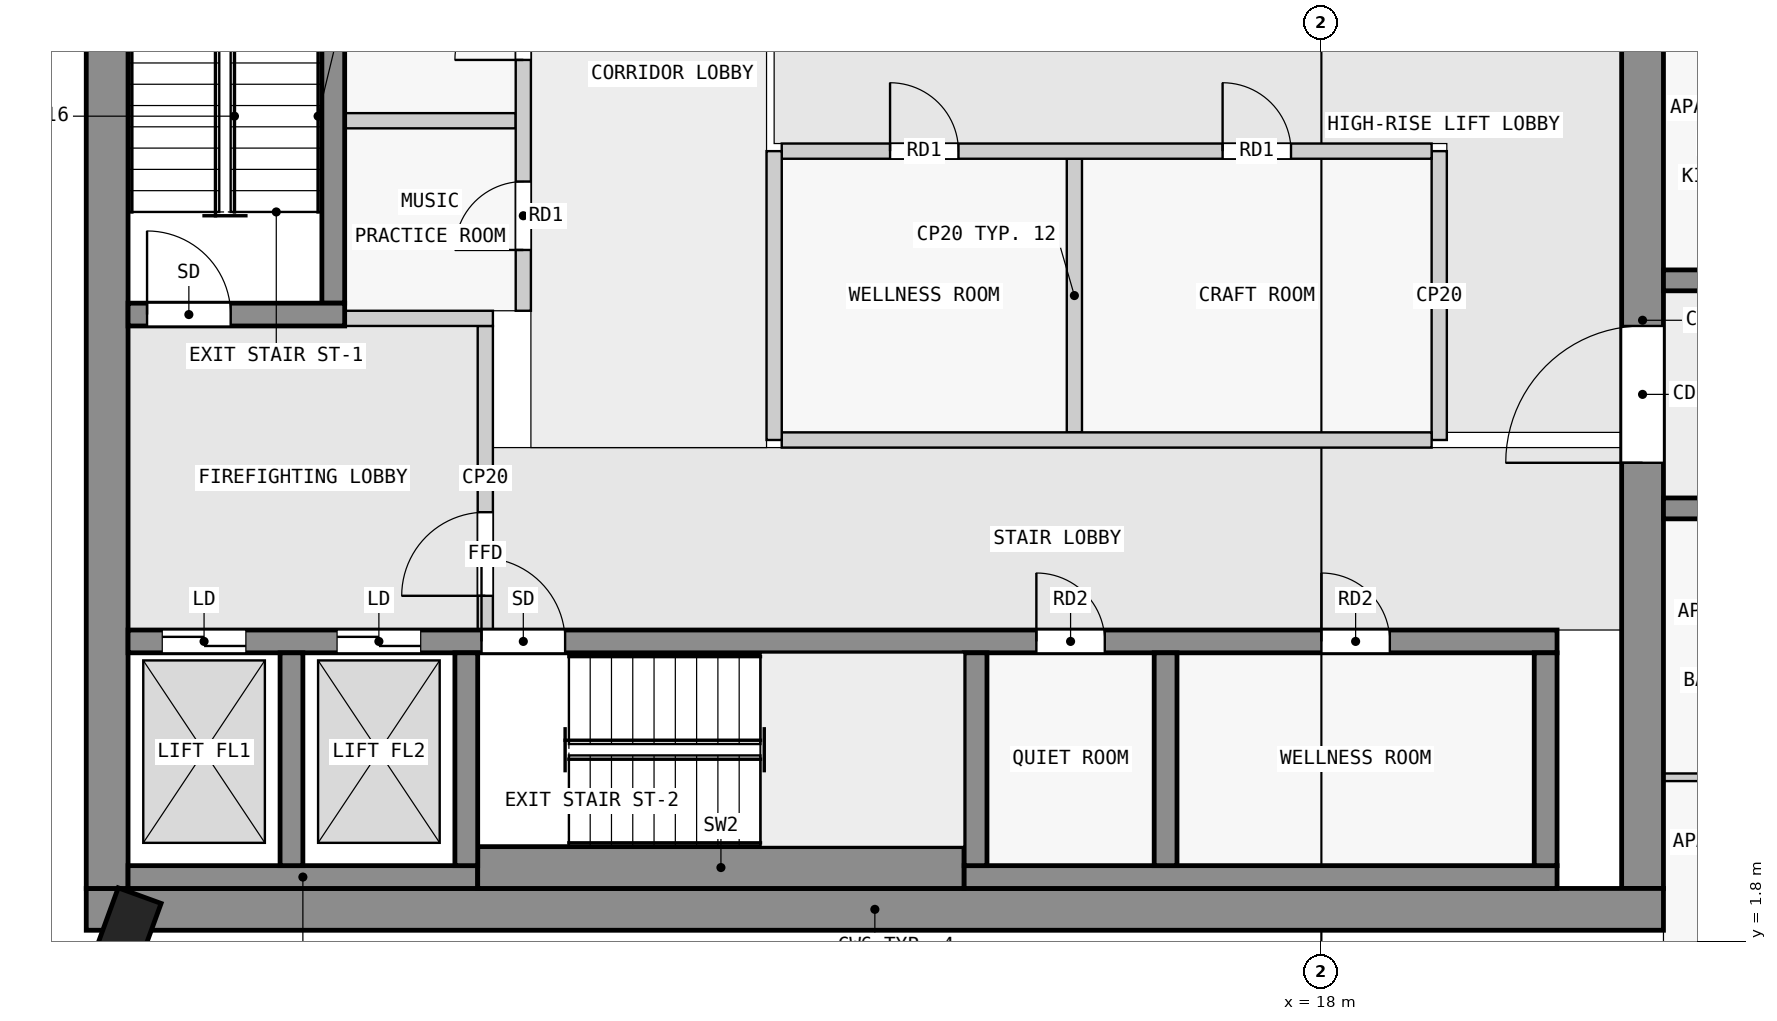
"""IFC4 building model, lengths in metres.
Left out: names, types, materials, properties, quantities, classifications, styles, units other than length and angle.
Written with IfcOpenShell. Run it as: python <this file> out.ifc"""

import sys

from ifc_helpers import new_model, si_unit, direction, frame, frame_2d, origin, origin_2d, place, context, subcontext, project, spatial, rectangle, extrude, element, fill, save


model = new_model("IFC4")
c1 = context("Model", 3, precision=1e-05, world=origin(), true_north=direction((0.0, 1.0)))
c2 = subcontext(c1, "Body", "Model", "MODEL_VIEW")
j1 = project(units=[si_unit("LENGTHUNIT", "METRE"), si_unit("PLANEANGLEUNIT", "RADIAN")], contexts=[c1])
p1 = place(None, origin())
s1 = spatial("IfcSite", under=j1, at=p1, CompositionType="ELEMENT")
p2 = place(p1, origin())
s2 = spatial("IfcBuilding", under=s1, at=p2, CompositionType="ELEMENT")
p3 = place(p2, frame((0.0, 0.0, 201.4)))
s3 = spatial("IfcBuildingStorey", under=s2, at=p3, CompositionType="ELEMENT", Elevation=201.4)
p4 = place(p3, frame((2.213, 1.748, 0.0), z_axis=(0.0, 0.0, 1.0), x_axis=(-0.939664280925, 0.342097996418, 0.0)))
e1 = element("IfcColumn", 1, at=p4, inside=s3, PredefinedType="COLUMN", context=c2, shape_type="SweptSolid", body=[
    extrude(rectangle(XDim=0.6, YDim=1.4, at=origin_2d()), origin(), (0.0, 0.0, 1.0), 3.5),
])
p5 = place(p3, frame((1.75, 2.225, 0.0), z_axis=(0.0, 0.0, 1.0), x_axis=(1.0, 0.0, 0.0)))
e2 = element("IfcWall", 2, at=p5, inside=s3, PredefinedType="SHEAR", context=c2, shape_type="SweptSolid", body=[
    extrude(rectangle(XDim=20.75, YDim=0.55, at=frame_2d((10.375, 0.0))), origin(), (0.0, 0.0, 1.0), 3.25),
])
p6 = place(p3, frame((2.025, 2.5, 0.0), z_axis=(0.0, 0.0, 1.0), x_axis=(0.0, 1.0, 0.0)))
e3 = element("IfcWall", 3, at=p6, inside=s3, PredefinedType="SHEAR", context=c2, shape_type="SweptSolid", body=[
    extrude(rectangle(XDim=14.95, YDim=0.55, at=frame_2d((7.475, 0.0))), origin(), (0.0, 0.0, 1.0), 3.25),
])
p7 = place(p3, frame((22.225, 2.5, 0.0), z_axis=(0.0, 0.0, 1.0), x_axis=(0.0, 1.0, 0.0)))
e4 = element("IfcWall", 4, at=p7, inside=s3, PredefinedType="SHEAR", context=c2, shape_type="SweptSolid", body=[
    extrude(rectangle(XDim=14.95, YDim=0.55, at=frame_2d((7.475, 0.0))), origin(), (0.0, 0.0, 1.0), 3.25),
])
p8 = place(p7, frame((5.6, 0.0, 0.0)))
e5 = element("IfcOpeningElement", 5, at=p8, cuts=e4, PredefinedType="OPENING", context=c2, shape_type="SweptSolid", body=[
    extrude(rectangle(XDim=1.8, YDim=2.1, at=frame_2d((0.9, 1.05))), frame((0.0, 0.285, 0.0), z_axis=(0.0, -1.0, 0.0), x_axis=(1.0, 0.0, 0.0)), (0.0, 0.0, 1.0), 0.57),
])
p9 = place(p3, frame((2.3, 2.65, 0.0), z_axis=(0.0, 0.0, 1.0), x_axis=(1.0, 0.0, 0.0)))
e6 = element("IfcWall", 6, at=p9, inside=s3, PredefinedType="SHEAR", context=c2, shape_type="SweptSolid", body=[
    extrude(rectangle(XDim=4.6, YDim=0.3, at=frame_2d((2.3, 0.0))), origin(), (0.0, 0.0, 1.0), 3.25),
])
p10 = place(p3, frame((6.9, 2.775, 0.0), z_axis=(0.0, 0.0, 1.0), x_axis=(1.0, 0.0, 0.0)))
e7 = element("IfcWall", 7, at=p10, inside=s3, PredefinedType="SHEAR", context=c2, shape_type="SweptSolid", body=[
    extrude(rectangle(XDim=6.4, YDim=0.55, at=frame_2d((3.2, 0.0))), origin(), (0.0, 0.0, 1.0), 3.25),
])
p11 = place(p3, frame((13.3, 2.65, 0.0), z_axis=(0.0, 0.0, 1.0), x_axis=(1.0, 0.0, 0.0)))
e8 = element("IfcWall", 8, at=p11, inside=s3, PredefinedType="SHEAR", context=c2, shape_type="SweptSolid", body=[
    extrude(rectangle(XDim=7.8, YDim=0.3, at=frame_2d((3.9, 0.0))), origin(), (0.0, 0.0, 1.0), 3.25),
])
for number, where, z_axis, x_axis in (
    (9, (4.45, 2.8, 0.0), (0.0, 0.0, 1.0), (0.0, 1.0, 0.0)),
    (10, (6.75, 2.8, 0.0), (0.0, 0.0, 1.0), (0.0, 1.0, 0.0)),
    (11, (13.45, 2.8, 0.0), (0.0, 0.0, 1.0), (0.0, 1.0, 0.0)),
    (12, (15.95, 2.8, 0.0), (0.0, 0.0, 1.0), (0.0, 1.0, 0.0)),
    (13, (20.95, 2.8, 0.0), (0.0, 0.0, 1.0), (0.0, 1.0, 0.0)),
):
    element("IfcWall", number, at=place(p3, frame(where, z_axis=z_axis, x_axis=x_axis)), inside=s3, PredefinedType="SHEAR", context=c2, shape_type="SweptSolid", body=[
        extrude(rectangle(XDim=2.8, YDim=0.3, at=frame_2d((1.4, 0.0))), origin(), (0.0, 0.0, 1.0), 3.25),
    ])
p12 = place(p3, frame((2.3, 5.75, 0.0), z_axis=(0.0, 0.0, 1.0), x_axis=(1.0, 0.0, 0.0)))
e14 = element("IfcWall", 14, at=p12, inside=s3, PredefinedType="SHEAR", context=c2, shape_type="SweptSolid", body=[
    extrude(rectangle(XDim=18.8, YDim=0.3, at=frame_2d((9.4, 0.0))), origin(), (0.0, 0.0, 1.0), 3.25),
])
p13 = place(p12, frame((4.65, 0.0, 0.0)))
e15 = element("IfcOpeningElement", 15, at=p13, cuts=e14, PredefinedType="OPENING", context=c2, shape_type="SweptSolid", body=[
    extrude(rectangle(XDim=1.1, YDim=2.1, at=frame_2d((0.55, 1.05))), frame((0.0, 0.16, 0.0), z_axis=(0.0, -1.0, 0.0), x_axis=(1.0, 0.0, 0.0)), (0.0, 0.0, 1.0), 0.32),
])
p14 = place(p12, frame((0.45, 0.0, 0.0)))
e16 = element("IfcOpeningElement", 16, at=p14, cuts=e14, PredefinedType="OPENING", context=c2, shape_type="SweptSolid", body=[
    extrude(rectangle(XDim=1.1, YDim=2.1, at=frame_2d((0.55, 1.05))), frame((0.0, 0.16, 0.0), z_axis=(0.0, -1.0, 0.0), x_axis=(1.0, 0.0, 0.0)), (0.0, 0.0, 1.0), 0.32),
])
p15 = place(p12, frame((2.75, 0.0, 0.0)))
e17 = element("IfcOpeningElement", 17, at=p15, cuts=e14, PredefinedType="OPENING", context=c2, shape_type="SweptSolid", body=[
    extrude(rectangle(XDim=1.1, YDim=2.1, at=frame_2d((0.55, 1.05))), frame((0.0, 0.16, 0.0), z_axis=(0.0, -1.0, 0.0), x_axis=(1.0, 0.0, 0.0)), (0.0, 0.0, 1.0), 0.32),
])
p16 = place(p12, frame((11.95, 0.0, 0.0)))
e18 = element("IfcOpeningElement", 18, at=p16, cuts=e14, PredefinedType="OPENING", context=c2, shape_type="SweptSolid", body=[
    extrude(rectangle(XDim=0.9, YDim=2.1, at=frame_2d((0.45, 1.05))), frame((0.0, 0.16, 0.0), z_axis=(0.0, -1.0, 0.0), x_axis=(1.0, 0.0, 0.0)), (0.0, 0.0, 1.0), 0.32),
])
p17 = place(p12, frame((15.7, 0.0, 0.0)))
e19 = element("IfcOpeningElement", 19, at=p17, cuts=e14, PredefinedType="OPENING", context=c2, shape_type="SweptSolid", body=[
    extrude(rectangle(XDim=0.9, YDim=2.1, at=frame_2d((0.45, 1.05))), frame((0.0, 0.16, 0.0), z_axis=(0.0, -1.0, 0.0), x_axis=(1.0, 0.0, 0.0)), (0.0, 0.0, 1.0), 0.32),
])
p18 = place(p3, frame((2.3, 10.05, 0.0), z_axis=(0.0, 0.0, 1.0), x_axis=(1.0, 0.0, 0.0)))
e20 = element("IfcWall", 20, at=p18, inside=s3, PredefinedType="SHEAR", context=c2, shape_type="SweptSolid", body=[
    extrude(rectangle(XDim=2.85, YDim=0.3, at=frame_2d((1.425, 0.0))), origin(), (0.0, 0.0, 1.0), 3.25),
])
p19 = place(p18, frame((0.25, 0.0, 0.0)))
e21 = element("IfcOpeningElement", 21, at=p19, cuts=e20, PredefinedType="OPENING", context=c2, shape_type="SweptSolid", body=[
    extrude(rectangle(XDim=1.1, YDim=2.1, at=frame_2d((0.55, 1.05))), frame((0.0, 0.16, 0.0), z_axis=(0.0, -1.0, 0.0), x_axis=(1.0, 0.0, 0.0)), (0.0, 0.0, 1.0), 0.32),
])
p20 = place(p3, frame((5.0, 10.2, 0.0), z_axis=(0.0, 0.0, 1.0), x_axis=(0.0, 1.0, 0.0)))
e22 = element("IfcWall", 22, at=p20, inside=s3, PredefinedType="SHEAR", context=c2, shape_type="SweptSolid", body=[
    extrude(rectangle(XDim=6.4, YDim=0.3, at=frame_2d((3.2, 0.0))), origin(), (0.0, 0.0, 1.0), 3.25),
])
p21 = place(p3, frame((22.5, 7.5, 0.0), z_axis=(0.0, 0.0, 1.0), x_axis=(1.0, 0.0, 0.0)))
e23 = element("IfcWall", 23, at=p21, inside=s3, PredefinedType="SHEAR", context=c2, shape_type="SweptSolid", body=[
    extrude(rectangle(XDim=22.5, YDim=0.275, at=frame_2d((11.25, 0.0))), origin(), (0.0, 0.0, 1.0), 3.25),
])
p22 = place(p21, frame((4.05, 0.0, 0.0)))
e24 = element("IfcOpeningElement", 24, at=p22, cuts=e23, PredefinedType="OPENING", context=c2, shape_type="SweptSolid", body=[
    extrude(rectangle(XDim=1.0, YDim=2.1, at=frame_2d((0.5, 1.05))), frame((0.0, 0.147, 0.0), z_axis=(0.0, -1.0, 0.0), x_axis=(1.0, 0.0, 0.0)), (0.0, 0.0, 1.0), 0.295),
])
p23 = place(p21, frame((10.35, 0.0, 0.0)))
e25 = element("IfcOpeningElement", 25, at=p23, cuts=e23, PredefinedType="OPENING", context=c2, shape_type="SweptSolid", body=[
    extrude(rectangle(XDim=1.8, YDim=2.1, at=frame_2d((0.9, 1.05))), frame((0.0, 0.147, 0.0), z_axis=(0.0, -1.0, 0.0), x_axis=(1.0, 0.0, 0.0)), (0.0, 0.0, 1.0), 0.295),
])
p24 = place(p21, frame((16.85, 0.0, 0.0)))
e26 = element("IfcOpeningElement", 26, at=p24, cuts=e23, PredefinedType="OPENING", context=c2, shape_type="SweptSolid", body=[
    extrude(rectangle(XDim=1.0, YDim=2.1, at=frame_2d((0.5, 1.05))), frame((0.0, 0.147, 0.0), z_axis=(0.0, -1.0, 0.0), x_axis=(1.0, 0.0, 0.0)), (0.0, 0.0, 1.0), 0.295),
])
p25 = place(p3, frame((22.5, 10.5, 0.0), z_axis=(0.0, 0.0, 1.0), x_axis=(1.0, 0.0, 0.0)))
e27 = element("IfcWall", 27, at=p25, inside=s3, PredefinedType="SHEAR", context=c2, shape_type="SweptSolid", body=[
    extrude(rectangle(XDim=22.5, YDim=0.275, at=frame_2d((11.25, 0.0))), origin(), (0.0, 0.0, 1.0), 3.25),
])
p26 = place(p25, frame((7.75, 0.0, 0.0)))
e28 = element("IfcOpeningElement", 28, at=p26, cuts=e27, PredefinedType="OPENING", context=c2, shape_type="SweptSolid", body=[
    extrude(rectangle(XDim=1.0, YDim=2.1, at=frame_2d((0.5, 1.05))), frame((0.0, 0.147, 0.0), z_axis=(0.0, -1.0, 0.0), x_axis=(1.0, 0.0, 0.0)), (0.0, 0.0, 1.0), 0.295),
])
p27 = place(p25, frame((18.75, 0.0, 0.0)))
e29 = element("IfcOpeningElement", 29, at=p27, cuts=e27, PredefinedType="OPENING", context=c2, shape_type="SweptSolid", body=[
    extrude(rectangle(XDim=0.9, YDim=2.1, at=frame_2d((0.45, 1.05))), frame((0.0, 0.147, 0.0), z_axis=(0.0, -1.0, 0.0), x_axis=(1.0, 0.0, 0.0)), (0.0, 0.0, 1.0), 0.295),
])
p28 = place(p25, frame((20.95, 0.0, 0.0)))
e30 = element("IfcOpeningElement", 30, at=p28, cuts=e27, PredefinedType="OPENING", context=c2, shape_type="SweptSolid", body=[
    extrude(rectangle(XDim=1.0, YDim=2.1, at=frame_2d((0.5, 1.05))), frame((0.0, 0.147, 0.0), z_axis=(0.0, -1.0, 0.0), x_axis=(1.0, 0.0, 0.0)), (0.0, 0.0, 1.0), 0.295),
])
p29 = place(p3, frame((7.0, 5.9, 0.0), z_axis=(0.0, 0.0, 1.0), x_axis=(0.0, 1.0, 0.0)))
e31 = element("IfcWall", 31, at=p29, inside=s3, PredefinedType="PARTITIONING", context=c2, shape_type="SweptSolid", body=[
    extrude(rectangle(XDim=4.0, YDim=0.2, at=frame_2d((2.0, 0.0))), origin(), (0.0, 0.0, 1.0), 3.25),
])
p30 = place(p29, frame((0.45, 0.0, 0.0)))
e32 = element("IfcOpeningElement", 32, at=p30, cuts=e31, PredefinedType="OPENING", context=c2, shape_type="SweptSolid", body=[
    extrude(rectangle(XDim=1.1, YDim=2.1, at=frame_2d((0.55, 1.05))), frame((0.0, 0.11, 0.0), z_axis=(0.0, -1.0, 0.0), x_axis=(1.0, 0.0, 0.0)), (0.0, 0.0, 1.0), 0.22),
])
p31 = place(p3, frame((5.15, 10.0, 0.0), z_axis=(0.0, 0.0, 1.0), x_axis=(1.0, 0.0, 0.0)))
e33 = element("IfcWall", 33, at=p31, inside=s3, PredefinedType="PARTITIONING", context=c2, shape_type="SweptSolid", body=[
    extrude(rectangle(XDim=1.95, YDim=0.2, at=frame_2d((0.975, 0.0))), origin(), (0.0, 0.0, 1.0), 3.25),
])
p32 = place(p3, frame((10.8, 8.4, 0.0), z_axis=(0.0, 0.0, 1.0), x_axis=(0.0, 1.0, 0.0)))
e34 = element("IfcWall", 34, at=p32, inside=s3, PredefinedType="PARTITIONING", context=c2, shape_type="SweptSolid", body=[
    extrude(rectangle(XDim=3.8, YDim=0.2, at=frame_2d((1.9, 0.0))), origin(), (0.0, 0.0, 1.0), 3.25),
])
p33 = place(p3, frame((10.9, 8.4, 0.0), z_axis=(0.0, 0.0, 1.0), x_axis=(1.0, 0.0, 0.0)))
e35 = element("IfcWall", 35, at=p33, inside=s3, PredefinedType="PARTITIONING", context=c2, shape_type="SweptSolid", body=[
    extrude(rectangle(XDim=8.55, YDim=0.2, at=frame_2d((4.275, 0.0))), origin(), (0.0, 0.0, 1.0), 3.25),
])
p34 = place(p3, frame((19.55, 8.4, 0.0), z_axis=(0.0, 0.0, 1.0), x_axis=(0.0, 1.0, 0.0)))
e36 = element("IfcWall", 36, at=p34, inside=s3, PredefinedType="PARTITIONING", context=c2, shape_type="SweptSolid", body=[
    extrude(rectangle(XDim=3.8, YDim=0.2, at=frame_2d((1.9, 0.0))), origin(), (0.0, 0.0, 1.0), 3.25),
])
p35 = place(p3, frame((10.9, 12.2, 0.0), z_axis=(0.0, 0.0, 1.0), x_axis=(1.0, 0.0, 0.0)))
e37 = element("IfcWall", 37, at=p35, inside=s3, PredefinedType="PARTITIONING", context=c2, shape_type="SweptSolid", body=[
    extrude(rectangle(XDim=8.55, YDim=0.2, at=frame_2d((4.275, 0.0))), origin(), (0.0, 0.0, 1.0), 3.25),
])
p36 = place(p35, frame((1.425, 0.0, 0.0)))
e38 = element("IfcOpeningElement", 38, at=p36, cuts=e37, PredefinedType="OPENING", context=c2, shape_type="SweptSolid", body=[
    extrude(rectangle(XDim=0.9, YDim=2.1, at=frame_2d((0.45, 1.05))), frame((0.0, 0.11, 0.0), z_axis=(0.0, -1.0, 0.0), x_axis=(1.0, 0.0, 0.0)), (0.0, 0.0, 1.0), 0.22),
])
p37 = place(p35, frame((5.8, 0.0, 0.0)))
e39 = element("IfcOpeningElement", 39, at=p37, cuts=e37, PredefinedType="OPENING", context=c2, shape_type="SweptSolid", body=[
    extrude(rectangle(XDim=0.9, YDim=2.1, at=frame_2d((0.45, 1.05))), frame((0.0, 0.11, 0.0), z_axis=(0.0, -1.0, 0.0), x_axis=(1.0, 0.0, 0.0)), (0.0, 0.0, 1.0), 0.22),
])
p38 = place(p3, frame((14.75, 8.5, 0.0), z_axis=(0.0, 0.0, 1.0), x_axis=(0.0, 1.0, 0.0)))
e40 = element("IfcWall", 40, at=p38, inside=s3, PredefinedType="PARTITIONING", context=c2, shape_type="SweptSolid", body=[
    extrude(rectangle(XDim=3.6, YDim=0.2, at=frame_2d((1.8, 0.0))), origin(), (0.0, 0.0, 1.0), 3.25),
])
p39 = place(p3, frame((7.5, 10.1, 0.0), z_axis=(0.0, 0.0, 1.0), x_axis=(0.0, 1.0, 0.0)))
e41 = element("IfcWall", 41, at=p39, inside=s3, PredefinedType="PARTITIONING", context=c2, shape_type="SweptSolid", body=[
    extrude(rectangle(XDim=7.35, YDim=0.2, at=frame_2d((3.675, 0.0))), origin(), (0.0, 0.0, 1.0), 3.25),
])
p40 = place(p39, frame((0.8, 0.0, 0.0)))
e42 = element("IfcOpeningElement", 42, at=p40, cuts=e41, PredefinedType="OPENING", context=c2, shape_type="SweptSolid", body=[
    extrude(rectangle(XDim=0.9, YDim=2.1, at=frame_2d((0.45, 1.05))), frame((0.0, 0.11, 0.0), z_axis=(0.0, -1.0, 0.0), x_axis=(1.0, 0.0, 0.0)), (0.0, 0.0, 1.0), 0.22),
])
p41 = place(p39, frame((3.3, 0.0, 0.0)))
e43 = element("IfcOpeningElement", 43, at=p41, cuts=e41, PredefinedType="OPENING", context=c2, shape_type="SweptSolid", body=[
    extrude(rectangle(XDim=0.9, YDim=2.1, at=frame_2d((0.45, 1.05))), frame((0.0, 0.11, 0.0), z_axis=(0.0, -1.0, 0.0), x_axis=(1.0, 0.0, 0.0)), (0.0, 0.0, 1.0), 0.22),
])
p42 = place(p39, frame((5.25, 0.0, 0.0)))
e44 = element("IfcOpeningElement", 44, at=p42, cuts=e41, PredefinedType="OPENING", context=c2, shape_type="SweptSolid", body=[
    extrude(rectangle(XDim=0.9, YDim=2.1, at=frame_2d((0.45, 1.05))), frame((0.0, 0.11, 0.0), z_axis=(0.0, -1.0, 0.0), x_axis=(1.0, 0.0, 0.0)), (0.0, 0.0, 1.0), 0.22),
])
p43 = place(p3, frame((5.15, 12.6, 0.0), z_axis=(0.0, 0.0, 1.0), x_axis=(1.0, 0.0, 0.0)))
e45 = element("IfcWall", 45, at=p43, inside=s3, PredefinedType="PARTITIONING", context=c2, shape_type="SweptSolid", body=[
    extrude(rectangle(XDim=2.25, YDim=0.2, at=frame_2d((1.125, 0.0))), origin(), (0.0, 0.0, 1.0), 3.25),
])
p44 = place(p3, frame((22.5, 3.962, 0.0), z_axis=(0.0, 0.0, 1.0), x_axis=(1.0, 0.0, 0.0)))
e46 = element("IfcWall", 46, at=p44, inside=s3, PredefinedType="PARTITIONING", context=c2, shape_type="SweptSolid", body=[
    extrude(rectangle(XDim=1.75, YDim=0.1, at=frame_2d((0.875, 0.0))), origin(), (0.0, 0.0, 1.0), 3.25),
])
p45 = place(p30, origin())
e47 = element("IfcDoor", 47, at=p45, inside=s3, OperationType="SINGLE_SWING_LEFT", PredefinedType="DOOR", context=c2, shape_type="SweptSolid", body=[
    extrude(rectangle(XDim=1.1, YDim=2.1, at=frame_2d((0.55, 1.05))), frame((0.0, 0.025, 0.0), z_axis=(0.0, -1.0, 0.0), x_axis=(1.0, 0.0, 0.0)), (0.0, 0.0, 1.0), 0.05),
])
fill(e32, e47)
p46 = place(p19, origin())
e48 = element("IfcDoor", 48, at=p46, inside=s3, OperationType="SINGLE_SWING_RIGHT", PredefinedType="DOOR", context=c2, shape_type="SweptSolid", body=[
    extrude(rectangle(XDim=1.1, YDim=2.1, at=frame_2d((0.55, 1.05))), frame((0.0, 0.025, 0.0), z_axis=(0.0, -1.0, 0.0), x_axis=(1.0, 0.0, 0.0)), (0.0, 0.0, 1.0), 0.05),
])
fill(e21, e48)
p47 = place(p36, origin())
e49 = element("IfcDoor", 49, at=p47, inside=s3, OperationType="SINGLE_SWING_LEFT", PredefinedType="DOOR", context=c2, shape_type="SweptSolid", body=[
    extrude(rectangle(XDim=0.9, YDim=2.1, at=frame_2d((0.45, 1.05))), frame((0.0, 0.025, 0.0), z_axis=(0.0, -1.0, 0.0), x_axis=(1.0, 0.0, 0.0)), (0.0, 0.0, 1.0), 0.05),
])
fill(e38, e49)
p48 = place(p37, origin())
e50 = element("IfcDoor", 50, at=p48, inside=s3, OperationType="SINGLE_SWING_LEFT", PredefinedType="DOOR", context=c2, shape_type="SweptSolid", body=[
    extrude(rectangle(XDim=0.9, YDim=2.1, at=frame_2d((0.45, 1.05))), frame((0.0, 0.025, 0.0), z_axis=(0.0, -1.0, 0.0), x_axis=(1.0, 0.0, 0.0)), (0.0, 0.0, 1.0), 0.05),
])
fill(e39, e50)
p49 = place(p13, origin())
e51 = element("IfcDoor", 51, at=p49, inside=s3, OperationType="SINGLE_SWING_LEFT", PredefinedType="DOOR", context=c2, shape_type="SweptSolid", body=[
    extrude(rectangle(XDim=1.1, YDim=2.1, at=frame_2d((0.55, 1.05))), frame((0.0, 0.025, 0.0), z_axis=(0.0, -1.0, 0.0), x_axis=(1.0, 0.0, 0.0)), (0.0, 0.0, 1.0), 0.05),
])
fill(e15, e51)
p50 = place(p14, origin())
e52 = element("IfcDoor", 52, at=p50, inside=s3, OperationType="DOUBLE_DOOR_SLIDING", PredefinedType="DOOR", context=c2, shape_type="SweptSolid", body=[
    extrude(rectangle(XDim=1.1, YDim=2.1, at=frame_2d((0.55, 1.05))), frame((0.0, 0.025, 0.0), z_axis=(0.0, -1.0, 0.0), x_axis=(1.0, 0.0, 0.0)), (0.0, 0.0, 1.0), 0.05),
])
fill(e16, e52)
p51 = place(p15, origin())
e53 = element("IfcDoor", 53, at=p51, inside=s3, OperationType="DOUBLE_DOOR_SLIDING", PredefinedType="DOOR", context=c2, shape_type="SweptSolid", body=[
    extrude(rectangle(XDim=1.1, YDim=2.1, at=frame_2d((0.55, 1.05))), frame((0.0, 0.025, 0.0), z_axis=(0.0, -1.0, 0.0), x_axis=(1.0, 0.0, 0.0)), (0.0, 0.0, 1.0), 0.05),
])
fill(e17, e53)
p52 = place(p8, origin())
e54 = element("IfcDoor", 54, at=p52, inside=s3, OperationType="DOUBLE_DOOR_SINGLE_SWING", PredefinedType="DOOR", context=c2, shape_type="SweptSolid", body=[
    extrude(rectangle(XDim=1.8, YDim=2.1, at=frame_2d((0.9, 1.05))), frame((0.0, 0.025, 0.0), z_axis=(0.0, -1.0, 0.0), x_axis=(1.0, 0.0, 0.0)), (0.0, 0.0, 1.0), 0.05),
])
fill(e5, e54)
p53 = place(p40, origin())
e55 = element("IfcDoor", 55, at=p53, inside=s3, OperationType="SINGLE_SWING_RIGHT", PredefinedType="DOOR", context=c2, shape_type="SweptSolid", body=[
    extrude(rectangle(XDim=0.9, YDim=2.1, at=frame_2d((0.45, 1.05))), frame((0.0, 0.025, 0.0), z_axis=(0.0, -1.0, 0.0), x_axis=(1.0, 0.0, 0.0)), (0.0, 0.0, 1.0), 0.05),
])
fill(e42, e55)
p54 = place(p41, origin())
e56 = element("IfcDoor", 56, at=p54, inside=s3, OperationType="SINGLE_SWING_RIGHT", PredefinedType="DOOR", context=c2, shape_type="SweptSolid", body=[
    extrude(rectangle(XDim=0.9, YDim=2.1, at=frame_2d((0.45, 1.05))), frame((0.0, 0.025, 0.0), z_axis=(0.0, -1.0, 0.0), x_axis=(1.0, 0.0, 0.0)), (0.0, 0.0, 1.0), 0.05),
])
fill(e43, e56)
p55 = place(p16, origin())
e57 = element("IfcDoor", 57, at=p55, inside=s3, OperationType="SINGLE_SWING_LEFT", PredefinedType="DOOR", context=c2, shape_type="SweptSolid", body=[
    extrude(rectangle(XDim=0.9, YDim=2.1, at=frame_2d((0.45, 1.05))), frame((0.0, 0.025, 0.0), z_axis=(0.0, -1.0, 0.0), x_axis=(1.0, 0.0, 0.0)), (0.0, 0.0, 1.0), 0.05),
])
fill(e18, e57)
p56 = place(p17, origin())
e58 = element("IfcDoor", 58, at=p56, inside=s3, OperationType="SINGLE_SWING_LEFT", PredefinedType="DOOR", context=c2, shape_type="SweptSolid", body=[
    extrude(rectangle(XDim=0.9, YDim=2.1, at=frame_2d((0.45, 1.05))), frame((0.0, 0.025, 0.0), z_axis=(0.0, -1.0, 0.0), x_axis=(1.0, 0.0, 0.0)), (0.0, 0.0, 1.0), 0.05),
])
fill(e19, e58)
save(model, sys.argv[1])
